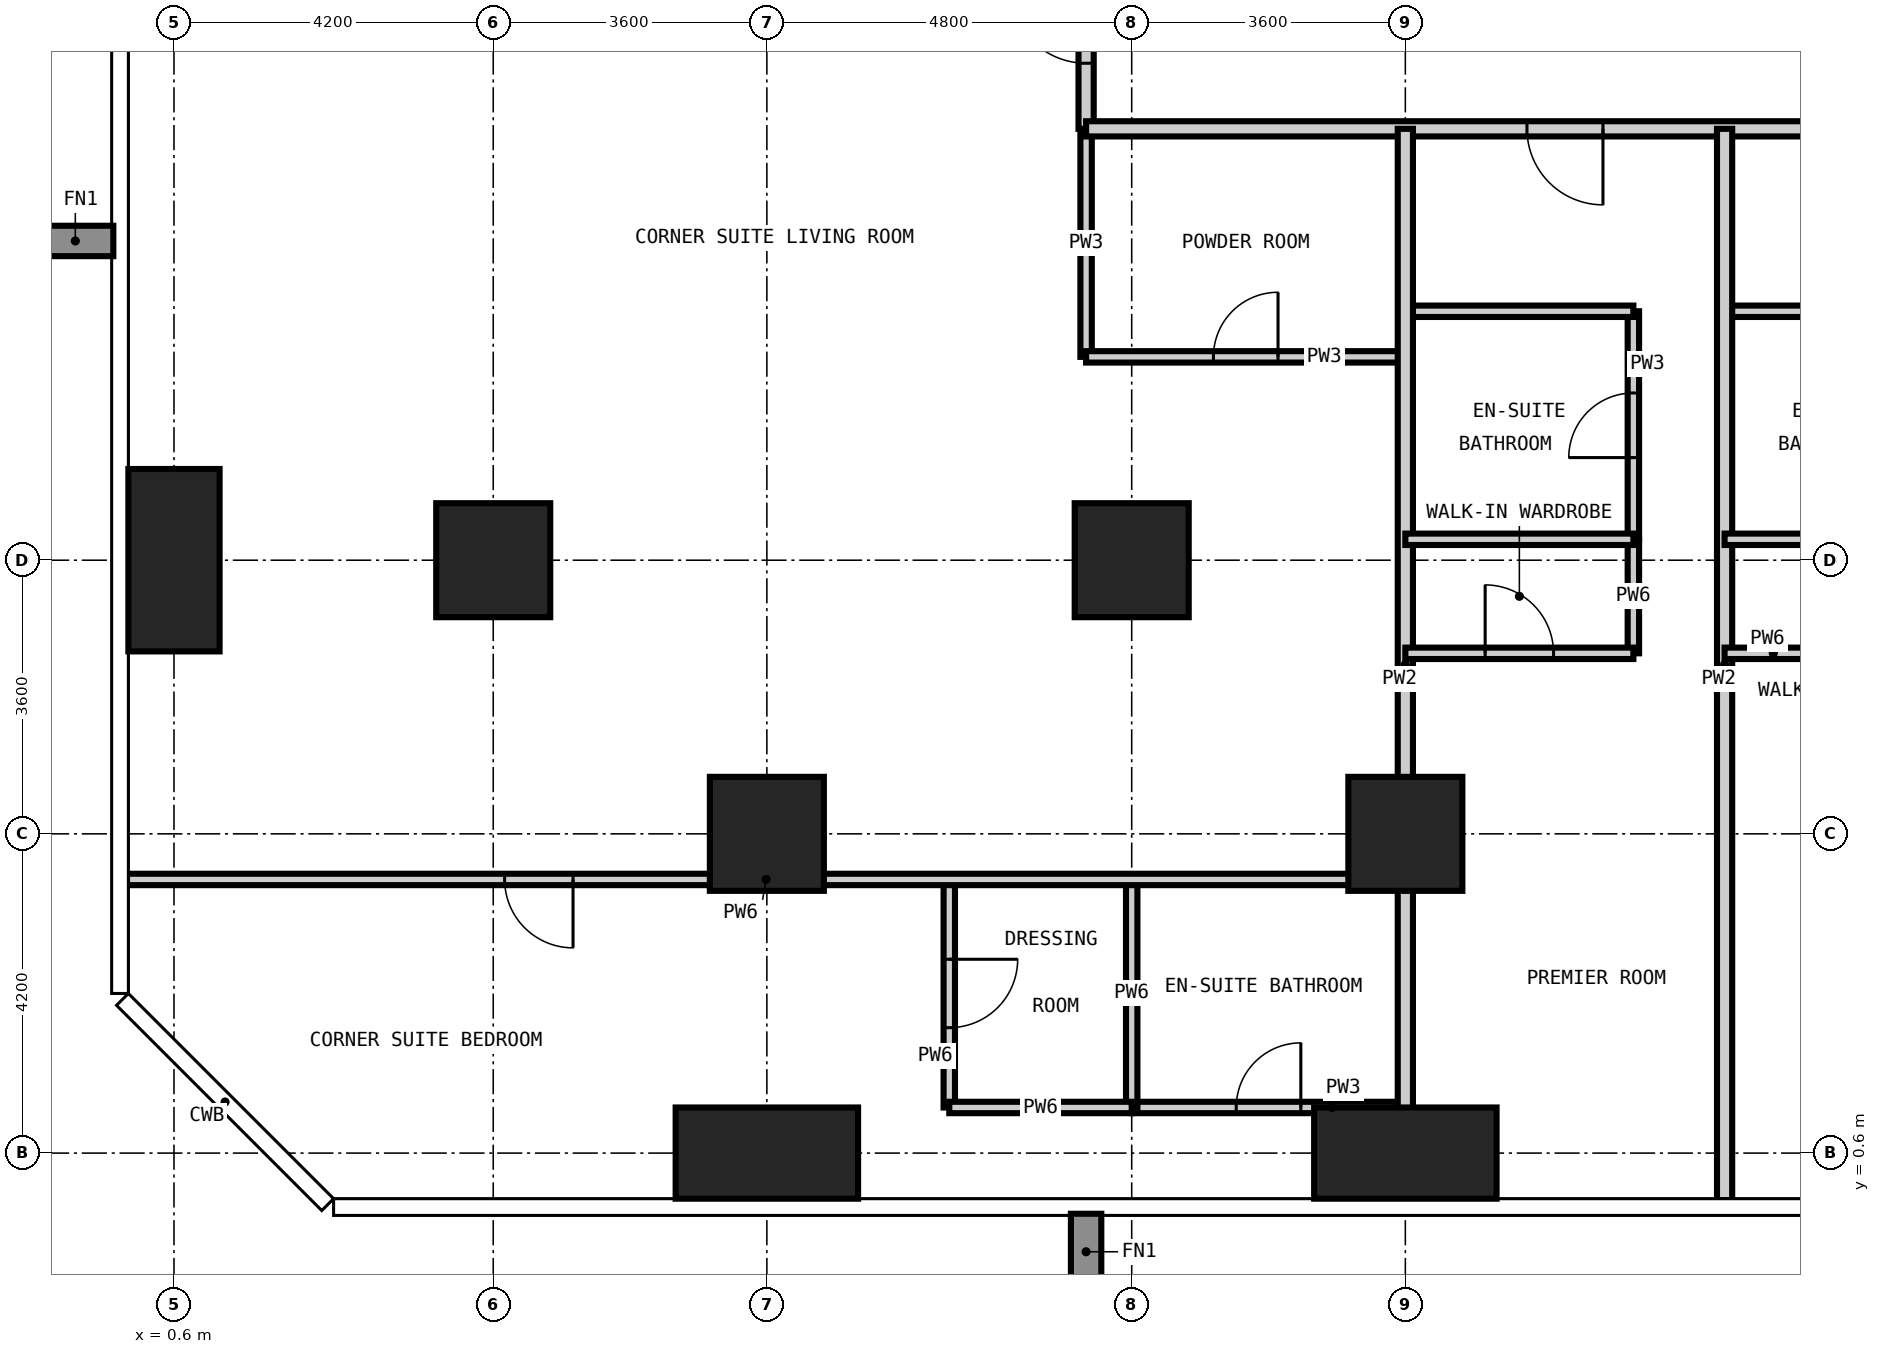
"""IFC4 building model, lengths in metres.
Left out: names, types, materials, properties, quantities, classifications, styles, units other than length and angle.
Written with IfcOpenShell. Run it as: python <this file> out.ifc"""

import sys

from ifc_helpers import new_model, si_unit, direction, frame, frame_2d, origin, origin_2d, place, context, subcontext, project, spatial, rectangle, extrude, element, fill, save


model = new_model("IFC4")
c1 = context("Model", 3, precision=1e-05, world=origin(), true_north=direction((0.0, 1.0)))
c2 = subcontext(c1, "Body", "Model", "MODEL_VIEW")
j1 = project(units=[si_unit("LENGTHUNIT", "METRE"), si_unit("PLANEANGLEUNIT", "RADIAN")], contexts=[c1])
p1 = place(None, origin())
s1 = spatial("IfcSite", under=j1, at=p1, CompositionType="ELEMENT")
p2 = place(p1, origin())
s2 = spatial("IfcBuilding", under=s1, at=p2, CompositionType="ELEMENT")
p3 = place(p2, frame((0.0, 0.0, 100.8)))
s3 = spatial("IfcBuildingStorey", under=s2, at=p3, CompositionType="ELEMENT", Elevation=100.8)
p4 = place(p3, frame((0.6, 8.4, -0.35), z_axis=(0.0, 0.0, 1.0), x_axis=(1.0, 0.0, 0.0)))
e1 = element("IfcColumn", 1, at=p4, inside=s3, PredefinedType="COLUMN", context=c2, shape_type="SweptSolid", body=[
    extrude(rectangle(XDim=1.2, YDim=2.4, at=origin_2d()), origin(), (0.0, 0.0, 1.0), 3.6),
])
p5 = place(p3, frame((4.8, 8.4, -0.35), z_axis=(0.0, 0.0, 1.0), x_axis=(1.0, 0.0, 0.0)))
e2 = element("IfcColumn", 2, at=p5, inside=s3, PredefinedType="COLUMN", context=c2, shape_type="SweptSolid", body=[
    extrude(rectangle(XDim=1.5, YDim=1.5, at=origin_2d()), origin(), (0.0, 0.0, 1.0), 3.6),
])
p6 = place(p3, frame((8.4, 0.6, -0.35), z_axis=(0.0, 0.0, 1.0), x_axis=(1.0, 0.0, 0.0)))
e3 = element("IfcColumn", 3, at=p6, inside=s3, PredefinedType="COLUMN", context=c2, shape_type="SweptSolid", body=[
    extrude(rectangle(XDim=2.4, YDim=1.2, at=origin_2d()), origin(), (0.0, 0.0, 1.0), 3.6),
])
for number, where, z_axis, x_axis in (
    (4, (8.4, 4.8, -0.35), (0.0, 0.0, 1.0), (1.0, 0.0, 0.0)),
    (5, (13.2, 8.4, -0.35), (0.0, 0.0, 1.0), (1.0, 0.0, 0.0)),
):
    element("IfcColumn", number, at=place(p3, frame(where, z_axis=z_axis, x_axis=x_axis)), inside=s3, PredefinedType="COLUMN", context=c2, shape_type="SweptSolid", body=[
        extrude(rectangle(XDim=1.5, YDim=1.5, at=origin_2d()), origin(), (0.0, 0.0, 1.0), 3.6),
    ])
p7 = place(p3, frame((16.8, 0.6, -0.35), z_axis=(0.0, 0.0, 1.0), x_axis=(1.0, 0.0, 0.0)))
e6 = element("IfcColumn", 6, at=p7, inside=s3, PredefinedType="COLUMN", context=c2, shape_type="SweptSolid", body=[
    extrude(rectangle(XDim=2.4, YDim=1.2, at=origin_2d()), origin(), (0.0, 0.0, 1.0), 3.6),
])
p8 = place(p3, frame((16.8, 4.8, -0.35), z_axis=(0.0, 0.0, 1.0), x_axis=(1.0, 0.0, 0.0)))
e7 = element("IfcColumn", 7, at=p8, inside=s3, PredefinedType="COLUMN", context=c2, shape_type="SweptSolid", body=[
    extrude(rectangle(XDim=1.5, YDim=1.5, at=origin_2d()), origin(), (0.0, 0.0, 1.0), 3.6),
])
p9 = place(p3, frame((12.6, 11.075, 0.0), z_axis=(0.0, 0.0, 1.0), x_axis=(0.0, 1.0, 0.0)))
e8 = element("IfcWall", 8, at=p9, inside=s3, PredefinedType="PARTITIONING", context=c2, shape_type="SweptSolid", body=[
    extrude(rectangle(XDim=3.0, YDim=0.15, at=frame_2d((1.5, 0.0))), origin(), (0.0, 0.0, 1.0), 3.25),
])
p10 = place(p3, frame((19.8, 8.675, 0.0), z_axis=(0.0, 0.0, 1.0), x_axis=(0.0, 1.0, 0.0)))
e9 = element("IfcWall", 9, at=p10, inside=s3, PredefinedType="PARTITIONING", context=c2, shape_type="SweptSolid", body=[
    extrude(rectangle(XDim=3.0, YDim=0.15, at=frame_2d((1.5, 0.0))), origin(), (0.0, 0.0, 1.0), 3.25),
])
p11 = place(p10, frame((1.075, 0.0, 0.0)))
e10 = element("IfcOpeningElement", 10, at=p11, cuts=e9, PredefinedType="OPENING", context=c2, shape_type="SweptSolid", body=[
    extrude(rectangle(XDim=0.85, YDim=2.1, at=frame_2d((0.425, 1.05))), frame((0.0, 0.085, 0.0), z_axis=(0.0, -1.0, 0.0), x_axis=(1.0, 0.0, 0.0)), (0.0, 0.0, 1.0), 0.17),
])
p12 = place(p3, frame((13.2, 1.2, 0.0), z_axis=(0.0, 0.0, 1.0), x_axis=(1.0, 0.0, 0.0)))
e11 = element("IfcWall", 11, at=p12, inside=s3, PredefinedType="PARTITIONING", context=c2, shape_type="SweptSolid", body=[
    extrude(rectangle(XDim=3.6, YDim=0.15, at=frame_2d((1.8, 0.0))), origin(), (0.0, 0.0, 1.0), 3.25),
])
p13 = place(p12, frame((1.375, 0.0, 0.0)))
e12 = element("IfcOpeningElement", 12, at=p13, cuts=e11, PredefinedType="OPENING", context=c2, shape_type="SweptSolid", body=[
    extrude(rectangle(XDim=0.85, YDim=2.1, at=frame_2d((0.425, 1.05))), frame((0.0, 0.085, 0.0), z_axis=(0.0, -1.0, 0.0), x_axis=(1.0, 0.0, 0.0)), (0.0, 0.0, 1.0), 0.17),
])
p14 = place(p3, frame((12.6, 11.075, 0.0), z_axis=(0.0, 0.0, 1.0), x_axis=(1.0, 0.0, 0.0)))
e13 = element("IfcWall", 13, at=p14, inside=s3, PredefinedType="PARTITIONING", context=c2, shape_type="SweptSolid", body=[
    extrude(rectangle(XDim=4.2, YDim=0.15, at=frame_2d((2.1, 0.0))), origin(), (0.0, 0.0, 1.0), 3.25),
])
p15 = place(p14, frame((1.675, 0.0, 0.0)))
e14 = element("IfcOpeningElement", 14, at=p15, cuts=e13, PredefinedType="OPENING", context=c2, shape_type="SweptSolid", body=[
    extrude(rectangle(XDim=0.85, YDim=2.1, at=frame_2d((0.425, 1.05))), frame((0.0, 0.085, 0.0), z_axis=(0.0, -1.0, 0.0), x_axis=(1.0, 0.0, 0.0)), (0.0, 0.0, 1.0), 0.17),
])
for number, where, z_axis, x_axis in (
    (15, (16.8, 11.675, 0.0), (0.0, 0.0, 1.0), (1.0, 0.0, 0.0)),
    (16, (21.0, 11.675, 0.0), (0.0, 0.0, 1.0), (1.0, 0.0, 0.0)),
):
    element("IfcWall", number, at=place(p3, frame(where, z_axis=z_axis, x_axis=x_axis)), inside=s3, PredefinedType="PARTITIONING", context=c2, shape_type="SweptSolid", body=[
        extrude(rectangle(XDim=3.0, YDim=0.15, at=frame_2d((1.5, 0.0))), origin(), (0.0, 0.0, 1.0), 3.25),
    ])
p16 = place(p3, frame((12.6, 14.075, 0.0), z_axis=(0.0, 0.0, 1.0), x_axis=(0.0, 1.0, 0.0)))
e17 = element("IfcWall", 17, at=p16, inside=s3, PredefinedType="PARTITIONING", context=c2, shape_type="SweptSolid", body=[
    extrude(rectangle(XDim=31.25, YDim=0.2, at=frame_2d((15.625, 0.0))), origin(), (0.0, 0.0, 1.0), 3.25),
])
p17 = place(p16, frame((5.225, 0.0, 0.0)))
e18 = element("IfcOpeningElement", 18, at=p17, cuts=e17, PredefinedType="OPENING", context=c2, shape_type="SweptSolid", body=[
    extrude(rectangle(XDim=1.0, YDim=2.2, at=frame_2d((0.5, 1.1))), frame((0.0, 0.11, 0.0), z_axis=(0.0, -1.0, 0.0), x_axis=(1.0, 0.0, 0.0)), (0.0, 0.0, 1.0), 0.22),
])
p18 = place(p16, frame((13.625, 0.0, 0.0)))
e19 = element("IfcOpeningElement", 19, at=p18, cuts=e17, PredefinedType="OPENING", context=c2, shape_type="SweptSolid", body=[
    extrude(rectangle(XDim=1.0, YDim=2.2, at=frame_2d((0.5, 1.1))), frame((0.0, 0.11, 0.0), z_axis=(0.0, -1.0, 0.0), x_axis=(1.0, 0.0, 0.0)), (0.0, 0.0, 1.0), 0.22),
])
p19 = place(p16, frame((22.025, 0.0, 0.0)))
e20 = element("IfcOpeningElement", 20, at=p19, cuts=e17, PredefinedType="OPENING", context=c2, shape_type="SweptSolid", body=[
    extrude(rectangle(XDim=1.0, YDim=2.2, at=frame_2d((0.5, 1.1))), frame((0.0, 0.11, 0.0), z_axis=(0.0, -1.0, 0.0), x_axis=(1.0, 0.0, 0.0)), (0.0, 0.0, 1.0), 0.22),
])
p20 = place(p16, frame((0.863, 0.0, 0.0)))
e21 = element("IfcOpeningElement", 21, at=p20, cuts=e17, PredefinedType="OPENING", context=c2, shape_type="SweptSolid", body=[
    extrude(rectangle(XDim=1.0, YDim=2.2, at=frame_2d((0.5, 1.1))), frame((0.0, 0.11, 0.0), z_axis=(0.0, -1.0, 0.0), x_axis=(1.0, 0.0, 0.0)), (0.0, 0.0, 1.0), 0.22),
])
p21 = place(p16, frame((29.088, 0.0, 0.0)))
e22 = element("IfcOpeningElement", 22, at=p21, cuts=e17, PredefinedType="OPENING", context=c2, shape_type="SweptSolid", body=[
    extrude(rectangle(XDim=1.0, YDim=2.2, at=frame_2d((0.5, 1.1))), frame((0.0, 0.11, 0.0), z_axis=(0.0, -1.0, 0.0), x_axis=(1.0, 0.0, 0.0)), (0.0, 0.0, 1.0), 0.22),
])
p22 = place(p3, frame((45.925, 14.075, 0.0), z_axis=(0.0, 0.0, 1.0), x_axis=(-1.0, 0.0, 0.0)))
e23 = element("IfcWall", 23, at=p22, inside=s3, PredefinedType="PARTITIONING", context=c2, shape_type="SweptSolid", body=[
    extrude(rectangle(XDim=33.325, YDim=0.2, at=frame_2d((16.663, 0.0))), origin(), (0.0, 0.0, 1.0), 3.25),
])
p23 = place(p22, frame((26.525, 0.0, 0.0)))
e24 = element("IfcOpeningElement", 24, at=p23, cuts=e23, PredefinedType="OPENING", context=c2, shape_type="SweptSolid", body=[
    extrude(rectangle(XDim=1.0, YDim=2.2, at=frame_2d((0.5, 1.1))), frame((0.0, 0.11, 0.0), z_axis=(0.0, -1.0, 0.0), x_axis=(1.0, 0.0, 0.0)), (0.0, 0.0, 1.0), 0.22),
])
p24 = place(p22, frame((20.225, 0.0, 0.0)))
e25 = element("IfcOpeningElement", 25, at=p24, cuts=e23, PredefinedType="OPENING", context=c2, shape_type="SweptSolid", body=[
    extrude(rectangle(XDim=1.0, YDim=2.2, at=frame_2d((0.5, 1.1))), frame((0.0, 0.11, 0.0), z_axis=(0.0, -1.0, 0.0), x_axis=(1.0, 0.0, 0.0)), (0.0, 0.0, 1.0), 0.22),
])
p25 = place(p22, frame((11.825, 0.0, 0.0)))
e26 = element("IfcOpeningElement", 26, at=p25, cuts=e23, PredefinedType="OPENING", context=c2, shape_type="SweptSolid", body=[
    extrude(rectangle(XDim=1.0, YDim=2.2, at=frame_2d((0.5, 1.1))), frame((0.0, 0.11, 0.0), z_axis=(0.0, -1.0, 0.0), x_axis=(1.0, 0.0, 0.0)), (0.0, 0.0, 1.0), 0.22),
])
p26 = place(p22, frame((5.525, 0.0, 0.0)))
e27 = element("IfcOpeningElement", 27, at=p26, cuts=e23, PredefinedType="OPENING", context=c2, shape_type="SweptSolid", body=[
    extrude(rectangle(XDim=1.0, YDim=2.2, at=frame_2d((0.5, 1.1))), frame((0.0, 0.11, 0.0), z_axis=(0.0, -1.0, 0.0), x_axis=(1.0, 0.0, 0.0)), (0.0, 0.0, 1.0), 0.22),
])
for number, where, z_axis, x_axis in (
    (28, (16.8, -0.018, 0.0), (0.0, 0.0, 1.0), (0.0, 1.0, 0.0)),
    (29, (21.0, -0.018, 0.0), (0.0, 0.0, 1.0), (0.0, 1.0, 0.0)),
):
    element("IfcWall", number, at=place(p3, frame(where, z_axis=z_axis, x_axis=x_axis)), inside=s3, PredefinedType="PARTITIONING", context=c2, shape_type="SweptSolid", body=[
        extrude(rectangle(XDim=14.093, YDim=0.2, at=frame_2d((7.046, 0.0))), origin(), (0.0, 0.0, 1.0), 3.25),
    ])
p27 = place(p3, frame((10.8, 1.2, 0.0), z_axis=(0.0, 0.0, 1.0), x_axis=(0.0, 1.0, 0.0)))
e30 = element("IfcWall", 30, at=p27, inside=s3, PredefinedType="PARTITIONING", context=c2, shape_type="SweptSolid", body=[
    extrude(rectangle(XDim=3.0, YDim=0.15, at=frame_2d((1.5, 0.0))), origin(), (0.0, 0.0, 1.0), 3.25),
])
p28 = place(p27, frame((1.05, 0.0, 0.0)))
e31 = element("IfcOpeningElement", 31, at=p28, cuts=e30, PredefinedType="OPENING", context=c2, shape_type="SweptSolid", body=[
    extrude(rectangle(XDim=0.9, YDim=2.1, at=frame_2d((0.45, 1.05))), frame((0.0, 0.085, 0.0), z_axis=(0.0, -1.0, 0.0), x_axis=(1.0, 0.0, 0.0)), (0.0, 0.0, 1.0), 0.17),
])
p29 = place(p3, frame((13.2, 1.2, 0.0), z_axis=(0.0, 0.0, 1.0), x_axis=(0.0, 1.0, 0.0)))
e32 = element("IfcWall", 32, at=p29, inside=s3, PredefinedType="PARTITIONING", context=c2, shape_type="SweptSolid", body=[
    extrude(rectangle(XDim=3.0, YDim=0.15, at=frame_2d((1.5, 0.0))), origin(), (0.0, 0.0, 1.0), 3.25),
])
p30 = place(p3, frame((19.8, 7.175, 0.0), z_axis=(0.0, 0.0, 1.0), x_axis=(0.0, 1.0, 0.0)))
e33 = element("IfcWall", 33, at=p30, inside=s3, PredefinedType="PARTITIONING", context=c2, shape_type="SweptSolid", body=[
    extrude(rectangle(XDim=1.5, YDim=0.15, at=frame_2d((0.75, 0.0))), origin(), (0.0, 0.0, 1.0), 3.25),
])
p31 = place(p3, frame((10.8, 1.2, 0.0), z_axis=(0.0, 0.0, 1.0), x_axis=(1.0, 0.0, 0.0)))
e34 = element("IfcWall", 34, at=p31, inside=s3, PredefinedType="PARTITIONING", context=c2, shape_type="SweptSolid", body=[
    extrude(rectangle(XDim=2.4, YDim=0.15, at=frame_2d((1.2, 0.0))), origin(), (0.0, 0.0, 1.0), 3.25),
])
p32 = place(p3, frame((-0.018, 4.2, 0.0), z_axis=(0.0, 0.0, 1.0), x_axis=(1.0, 0.0, 0.0)))
e35 = element("IfcWall", 35, at=p32, inside=s3, PredefinedType="PARTITIONING", context=c2, shape_type="SweptSolid", body=[
    extrude(rectangle(XDim=16.818, YDim=0.15, at=frame_2d((8.409, 0.0))), origin(), (0.0, 0.0, 1.0), 3.25),
])
p33 = place(p32, frame((4.968, 0.0, 0.0)))
e36 = element("IfcOpeningElement", 36, at=p33, cuts=e35, PredefinedType="OPENING", context=c2, shape_type="SweptSolid", body=[
    extrude(rectangle(XDim=0.9, YDim=2.1, at=frame_2d((0.45, 1.05))), frame((0.0, 0.085, 0.0), z_axis=(0.0, -1.0, 0.0), x_axis=(1.0, 0.0, 0.0)), (0.0, 0.0, 1.0), 0.17),
])
p34 = place(p3, frame((16.8, 7.175, 0.0), z_axis=(0.0, 0.0, 1.0), x_axis=(1.0, 0.0, 0.0)))
e37 = element("IfcWall", 37, at=p34, inside=s3, PredefinedType="PARTITIONING", context=c2, shape_type="SweptSolid", body=[
    extrude(rectangle(XDim=3.0, YDim=0.15, at=frame_2d((1.5, 0.0))), origin(), (0.0, 0.0, 1.0), 3.25),
])
p35 = place(p34, frame((1.05, 0.0, 0.0)))
e38 = element("IfcOpeningElement", 38, at=p35, cuts=e37, PredefinedType="OPENING", context=c2, shape_type="SweptSolid", body=[
    extrude(rectangle(XDim=0.9, YDim=2.1, at=frame_2d((0.45, 1.05))), frame((0.0, 0.085, 0.0), z_axis=(0.0, -1.0, 0.0), x_axis=(1.0, 0.0, 0.0)), (0.0, 0.0, 1.0), 0.17),
])
p36 = place(p3, frame((21.0, 7.175, 0.0), z_axis=(0.0, 0.0, 1.0), x_axis=(1.0, 0.0, 0.0)))
e39 = element("IfcWall", 39, at=p36, inside=s3, PredefinedType="PARTITIONING", context=c2, shape_type="SweptSolid", body=[
    extrude(rectangle(XDim=3.0, YDim=0.15, at=frame_2d((1.5, 0.0))), origin(), (0.0, 0.0, 1.0), 3.25),
])
p37 = place(p36, frame((1.05, 0.0, 0.0)))
e40 = element("IfcOpeningElement", 40, at=p37, cuts=e39, PredefinedType="OPENING", context=c2, shape_type="SweptSolid", body=[
    extrude(rectangle(XDim=0.9, YDim=2.1, at=frame_2d((0.45, 1.05))), frame((0.0, 0.085, 0.0), z_axis=(0.0, -1.0, 0.0), x_axis=(1.0, 0.0, 0.0)), (0.0, 0.0, 1.0), 0.17),
])
for number, where, z_axis, x_axis in (
    (41, (16.8, 8.675, 0.0), (0.0, 0.0, 1.0), (1.0, 0.0, 0.0)),
    (42, (21.0, 8.675, 0.0), (0.0, 0.0, 1.0), (1.0, 0.0, 0.0)),
):
    element("IfcWall", number, at=place(p3, frame(where, z_axis=z_axis, x_axis=x_axis)), inside=s3, PredefinedType="PARTITIONING", context=c2, shape_type="SweptSolid", body=[
        extrude(rectangle(XDim=3.0, YDim=0.15, at=frame_2d((1.5, 0.0))), origin(), (0.0, 0.0, 1.0), 3.25),
    ])
p38 = place(p23, origin())
e43 = element("IfcDoor", 43, at=p38, inside=s3, OperationType="SINGLE_SWING_LEFT", PredefinedType="DOOR", context=c2, shape_type="SweptSolid", body=[
    extrude(rectangle(XDim=1.0, YDim=2.2, at=frame_2d((0.5, 1.1))), frame((0.0, 0.025, 0.0), z_axis=(0.0, -1.0, 0.0), x_axis=(1.0, 0.0, 0.0)), (0.0, 0.0, 1.0), 0.05),
])
fill(e24, e43)
p39 = place(p11, origin())
e44 = element("IfcDoor", 44, at=p39, inside=s3, OperationType="SINGLE_SWING_LEFT", PredefinedType="DOOR", context=c2, shape_type="SweptSolid", body=[
    extrude(rectangle(XDim=0.85, YDim=2.1, at=frame_2d((0.425, 1.05))), frame((0.0, 0.025, 0.0), z_axis=(0.0, -1.0, 0.0), x_axis=(1.0, 0.0, 0.0)), (0.0, 0.0, 1.0), 0.05),
])
fill(e10, e44)
p40 = place(p35, origin())
e45 = element("IfcDoor", 45, at=p40, inside=s3, OperationType="SINGLE_SWING_LEFT", PredefinedType="DOOR", context=c2, shape_type="SweptSolid", body=[
    extrude(rectangle(XDim=0.9, YDim=2.1, at=frame_2d((0.45, 1.05))), frame((0.0, 0.025, 0.0), z_axis=(0.0, -1.0, 0.0), x_axis=(1.0, 0.0, 0.0)), (0.0, 0.0, 1.0), 0.05),
])
fill(e38, e45)
p41 = place(p20, origin())
e46 = element("IfcDoor", 46, at=p41, inside=s3, OperationType="SINGLE_SWING_RIGHT", PredefinedType="DOOR", context=c2, shape_type="SweptSolid", body=[
    extrude(rectangle(XDim=1.0, YDim=2.2, at=frame_2d((0.5, 1.1))), frame((0.0, 0.025, 0.0), z_axis=(0.0, -1.0, 0.0), x_axis=(1.0, 0.0, 0.0)), (0.0, 0.0, 1.0), 0.05),
])
fill(e21, e46)
p42 = place(p15, origin())
e47 = element("IfcDoor", 47, at=p42, inside=s3, OperationType="SINGLE_SWING_RIGHT", PredefinedType="DOOR", context=c2, shape_type="SweptSolid", body=[
    extrude(rectangle(XDim=0.85, YDim=2.1, at=frame_2d((0.425, 1.05))), frame((0.0, 0.025, 0.0), z_axis=(0.0, -1.0, 0.0), x_axis=(1.0, 0.0, 0.0)), (0.0, 0.0, 1.0), 0.05),
])
fill(e14, e47)
p43 = place(p33, frame((0.9, 0.0, 0.0), z_axis=(0.0, 0.0, 1.0), x_axis=(-1.0, 0.0, 0.0)))
e48 = element("IfcDoor", 48, at=p43, inside=s3, OperationType="SINGLE_SWING_LEFT", PredefinedType="DOOR", context=c2, shape_type="SweptSolid", body=[
    extrude(rectangle(XDim=0.9, YDim=2.1, at=frame_2d((0.45, 1.05))), frame((0.0, 0.025, 0.0), z_axis=(0.0, -1.0, 0.0), x_axis=(1.0, 0.0, 0.0)), (0.0, 0.0, 1.0), 0.05),
])
fill(e36, e48)
p44 = place(p13, origin())
e49 = element("IfcDoor", 49, at=p44, inside=s3, OperationType="SINGLE_SWING_RIGHT", PredefinedType="DOOR", context=c2, shape_type="SweptSolid", body=[
    extrude(rectangle(XDim=0.85, YDim=2.1, at=frame_2d((0.425, 1.05))), frame((0.0, 0.025, 0.0), z_axis=(0.0, -1.0, 0.0), x_axis=(1.0, 0.0, 0.0)), (0.0, 0.0, 1.0), 0.05),
])
fill(e12, e49)
p45 = place(p28, frame((0.9, 0.0, 0.0), z_axis=(0.0, 0.0, 1.0), x_axis=(-1.0, 0.0, 0.0)))
e50 = element("IfcDoor", 50, at=p45, inside=s3, OperationType="SINGLE_SWING_LEFT", PredefinedType="DOOR", context=c2, shape_type="SweptSolid", body=[
    extrude(rectangle(XDim=0.9, YDim=2.1, at=frame_2d((0.45, 1.05))), frame((0.0, 0.025, 0.0), z_axis=(0.0, -1.0, 0.0), x_axis=(1.0, 0.0, 0.0)), (0.0, 0.0, 1.0), 0.05),
])
fill(e31, e50)
save(model, sys.argv[1])
